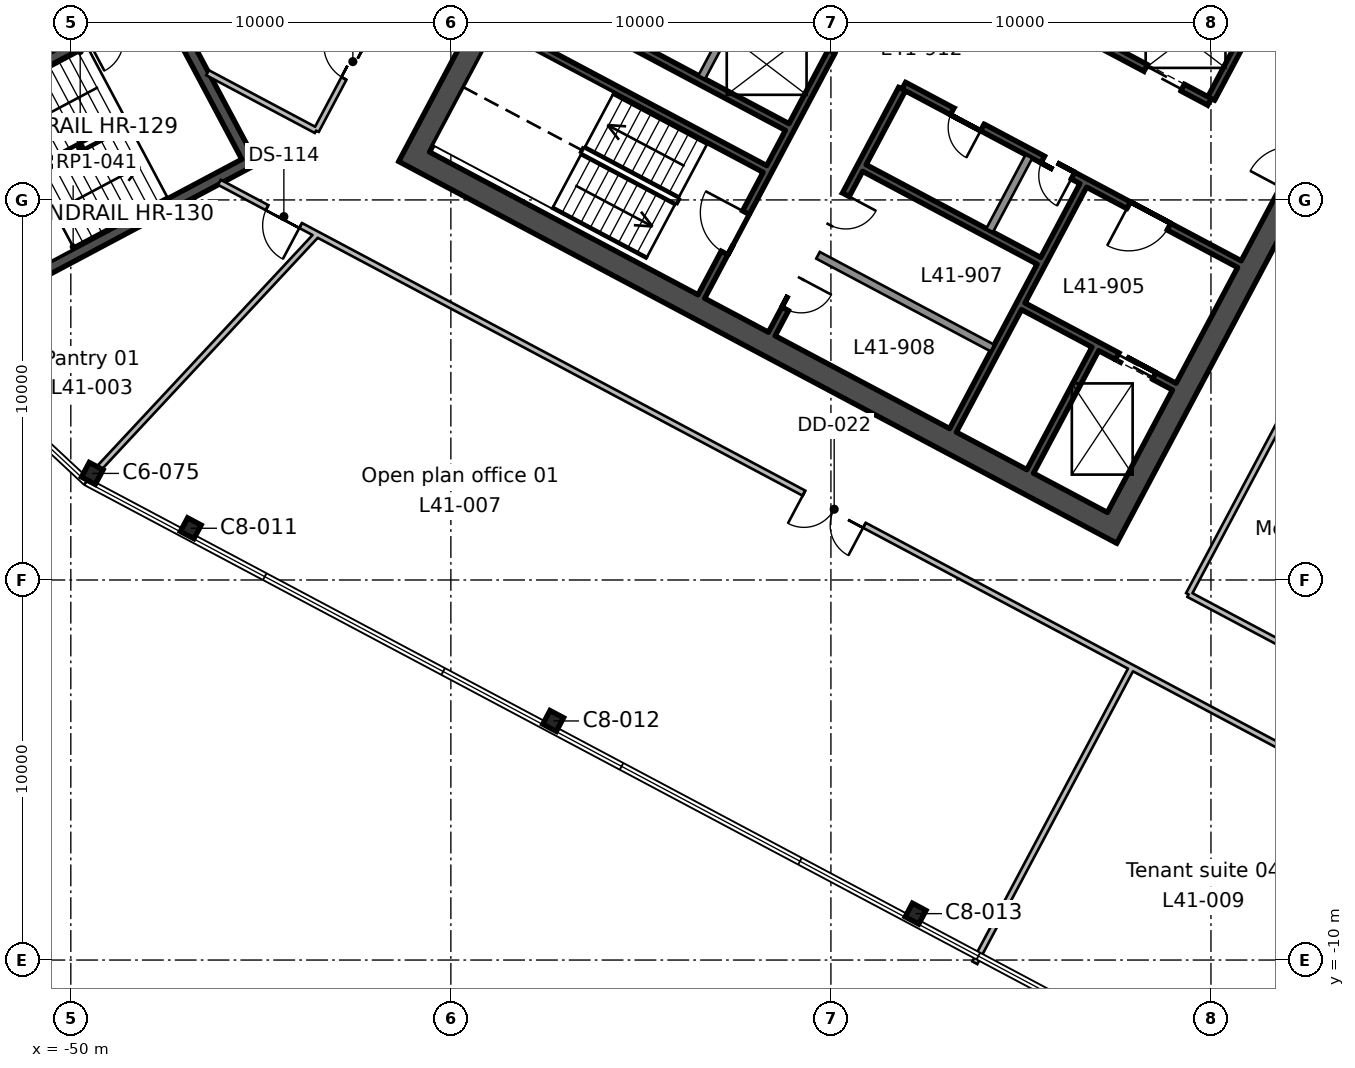
"""IFC4 building model, lengths in metres.
Left out: names, types, materials, properties, quantities, classifications, styles, units other than length and angle.
Written with IfcOpenShell. Run it as: python <this file> out.ifc"""

import sys

from ifc_helpers import new_model, si_unit, direction, frame, frame_2d, origin, origin_2d, place, context, subcontext, project, spatial, rectangle, i_section, extrude, element, fill, save


model = new_model("IFC4")
c1 = context("Model", 3, precision=1e-05, world=origin(), true_north=direction((0.0, 1.0)))
c2 = subcontext(c1, "Body", "Model", "MODEL_VIEW")
j1 = project(units=[si_unit("LENGTHUNIT", "METRE"), si_unit("PLANEANGLEUNIT", "RADIAN")], contexts=[c1])
p1 = place(None, origin())
s1 = spatial("IfcSite", under=j1, at=p1, CompositionType="ELEMENT")
p2 = place(p1, origin())
s2 = spatial("IfcBuilding", under=s1, at=p2, CompositionType="ELEMENT")
p3 = place(p2, frame((0.0, 0.0, 193.5)))
s3 = spatial("IfcBuildingStorey", under=s2, at=p3, CompositionType="ELEMENT", Elevation=193.5)
for number, where, z_axis, x_axis in (
    (1, (-27.772, -8.779, 0.0), (0.0, 0.0, 1.0), (0.883, -0.469, 0.0)),
    (2, (-37.308, -3.709, 0.0), (0.0, 0.0, 1.0), (0.883, -0.469, 0.0)),
    (3, (-46.844, 1.361, 0.0), (0.0, 0.0, 1.0), (0.883, -0.469, 0.0)),
):
    element("IfcColumn", number, at=place(p3, frame(where, z_axis=z_axis, x_axis=x_axis)), inside=s3, PredefinedType="COLUMN", context=c2, shape_type="SweptSolid", body=[
        extrude(i_section(OverallWidth=0.404, OverallDepth=0.406, WebThickness=0.027, FlangeThickness=0.044, FilletRadius=0.015, at=origin_2d()), origin(), (0.0, 0.0, 1.0), 3.9),
    ])
p4 = place(p3, frame((-49.435, 2.804, 0.0), z_axis=(0.0, 0.0, 1.0), x_axis=(0.882947592859, -0.469471562786, 0.0)))
e4 = element("IfcColumn", 4, at=p4, inside=s3, PredefinedType="COLUMN", context=c2, shape_type="SweptSolid", body=[
    extrude(i_section(OverallWidth=0.412, OverallDepth=0.434, WebThickness=0.036, FlangeThickness=0.057, FilletRadius=0.015, at=origin_2d()), origin(), (0.0, 0.0, 1.0), 3.9),
])
p5 = place(p3, frame((-13.635, 18.236, 0.0), z_axis=(0.0, 0.0, 1.0), x_axis=(-0.469478769487, -0.88294376095, 0.0)))
e5 = element("IfcWall", 5, at=p5, inside=s3, PredefinedType="SHEAR", context=c2, shape_type="SweptSolid", body=[
    extrude(rectangle(XDim=19.4, YDim=0.6, at=frame_2d((9.7, 0.0))), origin(), (0.0, 0.0, 1.0), 3.9),
])
p6 = place(p5, frame((6.7, 0.0, 0.0)))
e6 = element("IfcOpeningElement", 6, at=p6, cuts=e5, PredefinedType="OPENING", context=c2, shape_type="SweptSolid", body=[
    extrude(rectangle(XDim=2.4, YDim=2.4, at=frame_2d((1.2, 1.2))), frame((0.0, 0.31, 0.0), z_axis=(0.0, -1.0, 0.0), x_axis=(1.0, 0.0, 0.0)), (0.0, 0.0, 1.0), 0.62),
])
p7 = place(p3, frame((-32.0, 28.001, 0.0), z_axis=(0.0, 0.0, 1.0), x_axis=(-0.469468958625, -0.882948977511, 0.0)))
e7 = element("IfcWall", 7, at=p7, inside=s3, PredefinedType="SHEAR", context=c2, shape_type="SweptSolid", body=[
    extrude(rectangle(XDim=19.4, YDim=0.6, at=frame_2d((9.7, 0.0))), origin(), (0.0, 0.0, 1.0), 3.9),
])
p8 = place(p7, frame((10.3, 0.0, 0.0)))
e8 = element("IfcOpeningElement", 8, at=p8, cuts=e7, PredefinedType="OPENING", context=c2, shape_type="SweptSolid", body=[
    extrude(rectangle(XDim=2.4, YDim=2.4, at=frame_2d((1.2, 1.2))), frame((0.0, 0.31, 0.0), z_axis=(0.0, -1.0, 0.0), x_axis=(1.0, 0.0, 0.0)), (0.0, 0.0, 1.0), 0.62),
])
p9 = place(p3, frame((-22.867, 1.512, 0.0), z_axis=(0.0, 0.0, 1.0), x_axis=(-0.88294509198, 0.469476266226, 0.0)))
e9 = element("IfcWall", 9, at=p9, inside=s3, PredefinedType="SHEAR", context=c2, shape_type="SweptSolid", body=[
    extrude(rectangle(XDim=20.2, YDim=0.6, at=frame_2d((10.1, 0.0))), origin(), (0.0, 0.0, 1.0), 3.9),
])
p10 = place(p3, frame((-23.043, 6.08, 0.0), z_axis=(0.0, 0.0, 1.0), x_axis=(-0.469494272526, -0.882935517501, 0.0)))
e10 = element("IfcWall", 10, at=p10, inside=s3, PredefinedType="SHEAR", context=c2, shape_type="SweptSolid", body=[
    extrude(rectangle(XDim=3.65, YDim=0.2, at=frame_2d((1.825, 0.0))), origin(), (0.0, 0.0, 1.0), 3.9),
])
p11 = place(p3, frame((-18.96, 14.611, 0.0), z_axis=(0.0, 0.0, 1.0), x_axis=(-0.4694473164, -0.882960484464, 0.0)))
e11 = element("IfcWall", 11, at=p11, inside=s3, PredefinedType="SHEAR", context=c2, shape_type="SweptSolid", body=[
    extrude(rectangle(XDim=2.2, YDim=0.2, at=frame_2d((1.1, 0.0))), origin(), (0.0, 0.0, 1.0), 3.9),
])
p12 = place(p3, frame((-23.36, 10.382, 0.0), z_axis=(0.0, 0.0, 1.0), x_axis=(-0.469480409012, -0.88294288918, 0.0)))
e12 = element("IfcWall", 12, at=p12, inside=s3, PredefinedType="SHEAR", context=c2, shape_type="SweptSolid", body=[
    extrude(rectangle(XDim=7.3, YDim=0.2, at=frame_2d((3.65, 0.0))), origin(), (0.0, 0.0, 1.0), 3.9),
])
p13 = place(p3, frame((-24.791, 11.143, 0.0), z_axis=(0.0, 0.0, 1.0), x_axis=(-0.469487830541, -0.882938942948, 0.0)))
e13 = element("IfcWall", 13, at=p13, inside=s3, PredefinedType="SOLIDWALL", context=c2, shape_type="SweptSolid", body=[
    extrude(rectangle(XDim=2.2, YDim=0.2, at=frame_2d((1.1, 0.0))), origin(), (0.0, 0.0, 1.0), 3.9),
])
p14 = place(p3, frame((-28.128, 12.917, 0.0), z_axis=(0.0, 0.0, 1.0), x_axis=(-0.469454336211, -0.882956752176, 0.0)))
e14 = element("IfcWall", 14, at=p14, inside=s3, PredefinedType="SHEAR", context=c2, shape_type="SweptSolid", body=[
    extrude(rectangle(XDim=7.3, YDim=0.2, at=frame_2d((3.65, 0.0))), origin(), (0.0, 0.0, 1.0), 3.9),
])
p15 = place(p14, frame((3.15, 0.0, 0.0)))
e15 = element("IfcOpeningElement", 15, at=p15, cuts=e14, PredefinedType="OPENING", context=c2, shape_type="SweptSolid", body=[
    extrude(rectangle(XDim=0.9, YDim=2.1, at=frame_2d((0.45, 1.05))), frame((0.0, 0.11, 0.0), z_axis=(0.0, -1.0, 0.0), x_axis=(1.0, 0.0, 0.0)), (0.0, 0.0, 1.0), 0.22),
])
p16 = place(p14, frame((5.65, 0.0, 0.0)))
e16 = element("IfcOpeningElement", 16, at=p16, cuts=e14, PredefinedType="OPENING", context=c2, shape_type="SweptSolid", body=[
    extrude(rectangle(XDim=0.9, YDim=2.1, at=frame_2d((0.45, 1.05))), frame((0.0, 0.11, 0.0), z_axis=(0.0, -1.0, 0.0), x_axis=(1.0, 0.0, 0.0)), (0.0, 0.0, 1.0), 0.22),
])
p17 = place(p3, frame((-29.982, 13.903, 0.0), z_axis=(0.0, 0.0, 1.0), x_axis=(-0.469454336211, -0.882956752176, 0.0)))
e17 = element("IfcWall", 17, at=p17, inside=s3, PredefinedType="SHEAR", context=c2, shape_type="SweptSolid", body=[
    extrude(rectangle(XDim=7.3, YDim=0.2, at=frame_2d((3.65, 0.0))), origin(), (0.0, 0.0, 1.0), 3.9),
])
p18 = place(p17, frame((4.8, 0.0, 0.0)))
e18 = element("IfcOpeningElement", 18, at=p18, cuts=e17, PredefinedType="OPENING", context=c2, shape_type="SweptSolid", body=[
    extrude(rectangle(XDim=1.2, YDim=2.1, at=frame_2d((0.6, 1.05))), frame((0.0, 0.11, 0.0), z_axis=(0.0, -1.0, 0.0), x_axis=(1.0, 0.0, 0.0)), (0.0, 0.0, 1.0), 0.22),
])
p19 = place(p3, frame((-32.366, 15.171, 0.0), z_axis=(0.0, 0.0, 1.0), x_axis=(-0.469487830541, -0.882938942948, 0.0)))
e19 = element("IfcWall", 19, at=p19, inside=s3, PredefinedType="SOLIDWALL", context=c2, shape_type="SweptSolid", body=[
    extrude(rectangle(XDim=2.2, YDim=0.2, at=frame_2d((1.1, 0.0))), origin(), (0.0, 0.0, 1.0), 3.9),
])
p20 = place(p3, frame((-16.529, 13.432, 0.0), z_axis=(0.0, 0.0, 1.0), x_axis=(-0.88295287151, 0.469461634952, 0.0)))
e20 = element("IfcWall", 20, at=p20, inside=s3, PredefinedType="SHEAR", context=c2, shape_type="SweptSolid", body=[
    extrude(rectangle(XDim=8.0, YDim=0.2, at=frame_2d((4.0, 0.0))), origin(), (0.0, 0.0, 1.0), 3.9),
])
p21 = place(p3, frame((-20.04, 12.581, 0.0), z_axis=(0.0, 0.0, 1.0), x_axis=(-0.882942972946, 0.469480251476, 0.0)))
e21 = element("IfcWall", 21, at=p21, inside=s3, PredefinedType="SHEAR", context=c2, shape_type="SweptSolid", body=[
    extrude(rectangle(XDim=5.4, YDim=0.2, at=frame_2d((2.7, 0.0))), origin(), (0.0, 0.0, 1.0), 3.9),
])
p22 = place(p21, frame((0.8, 0.0, 0.0)))
e22 = element("IfcOpeningElement", 22, at=p22, cuts=e21, PredefinedType="OPENING", context=c2, shape_type="SweptSolid", body=[
    extrude(rectangle(XDim=1.1, YDim=2.1, at=frame_2d((0.55, 1.05))), frame((0.0, 0.11, 0.0), z_axis=(0.0, -1.0, 0.0), x_axis=(1.0, 0.0, 0.0)), (0.0, 0.0, 1.0), 0.22),
])
p23 = place(p21, frame((3.5, 0.0, 0.0)))
e23 = element("IfcOpeningElement", 23, at=p23, cuts=e21, PredefinedType="OPENING", context=c2, shape_type="SweptSolid", body=[
    extrude(rectangle(XDim=1.1, YDim=2.1, at=frame_2d((0.55, 1.05))), frame((0.0, 0.11, 0.0), z_axis=(0.0, -1.0, 0.0), x_axis=(1.0, 0.0, 0.0)), (0.0, 0.0, 1.0), 0.22),
])
p24 = place(p3, frame((-19.252, 8.311, 0.0), z_axis=(0.0, 0.0, 1.0), x_axis=(-0.882955722218, 0.469456273365, 0.0)))
e24 = element("IfcWall", 24, at=p24, inside=s3, PredefinedType="SHEAR", context=c2, shape_type="SweptSolid", body=[
    extrude(rectangle(XDim=10.0, YDim=0.2, at=frame_2d((5.0, 0.0))), origin(), (0.0, 0.0, 1.0), 3.9),
])
p25 = place(p24, frame((2.1, 0.0, 0.0)))
e25 = element("IfcOpeningElement", 25, at=p25, cuts=e24, PredefinedType="OPENING", context=c2, shape_type="SweptSolid", body=[
    extrude(rectangle(XDim=1.2, YDim=2.1, at=frame_2d((0.6, 1.05))), frame((0.0, 0.11, 0.0), z_axis=(0.0, -1.0, 0.0), x_axis=(1.0, 0.0, 0.0)), (0.0, 0.0, 1.0), 0.22),
])
p26 = place(p24, frame((4.96, 0.0, 0.0)))
e26 = element("IfcOpeningElement", 26, at=p26, cuts=e24, PredefinedType="OPENING", context=c2, shape_type="SweptSolid", body=[
    extrude(rectangle(XDim=0.9, YDim=2.1, at=frame_2d((0.45, 1.05))), frame((0.0, 0.11, 0.0), z_axis=(0.0, -1.0, 0.0), x_axis=(1.0, 0.0, 0.0)), (0.0, 0.0, 1.0), 0.22),
])
p27 = place(p24, frame((7.66, 0.0, 0.0)))
e27 = element("IfcOpeningElement", 27, at=p27, cuts=e24, PredefinedType="OPENING", context=c2, shape_type="SweptSolid", body=[
    extrude(rectangle(XDim=0.9, YDim=2.1, at=frame_2d((0.45, 1.05))), frame((0.0, 0.11, 0.0), z_axis=(0.0, -1.0, 0.0), x_axis=(1.0, 0.0, 0.0)), (0.0, 0.0, 1.0), 0.22),
])
p28 = place(p3, frame((-24.528, 8.398, 0.0), z_axis=(0.0, 0.0, 1.0), x_axis=(-0.882953967957, 0.469459572775, 0.0)))
e28 = element("IfcWall", 28, at=p28, inside=s3, PredefinedType="SHEAR", context=c2, shape_type="SweptSolid", body=[
    extrude(rectangle(XDim=5.2, YDim=0.2, at=frame_2d((2.6, 0.0))), origin(), (0.0, 0.0, 1.0), 3.9),
])
p29 = place(p3, frame((-31.15, 11.919, 0.0), z_axis=(0.0, 0.0, 1.0), x_axis=(-0.882940221191, 0.469485426614, 0.0)))
e29 = element("IfcWall", 29, at=p29, inside=s3, PredefinedType="SHEAR", context=c2, shape_type="SweptSolid", body=[
    extrude(rectangle(XDim=8.0, YDim=0.2, at=frame_2d((4.0, 0.0))), origin(), (0.0, 0.0, 1.0), 3.9),
])
p30 = place(p3, frame((-20.965, 5.088, 0.0), z_axis=(0.0, 0.0, 1.0), x_axis=(-0.882925986334, 0.469512196493, 0.0)))
e30 = element("IfcWall", 30, at=p30, inside=s3, PredefinedType="SHEAR", context=c2, shape_type="SweptSolid", body=[
    extrude(rectangle(XDim=4.5, YDim=0.2, at=frame_2d((2.25, 0.0))), origin(), (0.0, 0.0, 1.0), 3.9),
])
p31 = place(p30, frame((0.6, 0.0, 0.0)))
e31 = element("IfcOpeningElement", 31, at=p31, cuts=e30, PredefinedType="OPENING", context=c2, shape_type="SweptSolid", body=[
    extrude(rectangle(XDim=1.1, YDim=2.1, at=frame_2d((0.55, 1.05))), frame((0.0, 0.11, 0.0), z_axis=(0.0, -1.0, 0.0), x_axis=(1.0, 0.0, 0.0)), (0.0, 0.0, 1.0), 0.22),
])
p32 = place(p3, frame((-31.737, 10.816, 0.0), z_axis=(0.0, 0.0, 1.0), x_axis=(-0.882940221191, 0.469485426614, 0.0)))
e32 = element("IfcWall", 32, at=p32, inside=s3, PredefinedType="SHEAR", context=c2, shape_type="SweptSolid", body=[
    extrude(rectangle(XDim=8.0, YDim=0.2, at=frame_2d((4.0, 0.0))), origin(), (0.0, 0.0, 1.0), 3.9),
])
p33 = place(p3, frame((-25.749, 6.103, 0.0), z_axis=(0.0, 0.0, 1.0), x_axis=(-0.882953967957, 0.469459572775, 0.0)))
e33 = element("IfcWall", 33, at=p33, inside=s3, PredefinedType="SOLIDWALL", context=c2, shape_type="SweptSolid", body=[
    extrude(rectangle(XDim=5.2, YDim=0.2, at=frame_2d((2.6, 0.0))), origin(), (0.0, 0.0, 1.0), 3.9),
])
p34 = place(p3, frame((-47.574, 15.29, 0.0), z_axis=(0.0, 0.0, 1.0), x_axis=(0.469443498566, -0.882962514297, 0.0)))
e34 = element("IfcWall", 34, at=p34, inside=s3, PredefinedType="SHEAR", context=c2, shape_type="SweptSolid", body=[
    extrude(rectangle(XDim=4.85, YDim=0.3, at=frame_2d((2.425, 0.0))), origin(), (0.0, 0.0, 1.0), 3.9),
])
p35 = place(p3, frame((-45.297, 11.007, 0.0), z_axis=(0.0, 0.0, 1.0), x_axis=(-0.882951519127, -0.469464178475, 0.0)))
e35 = element("IfcWall", 35, at=p35, inside=s3, PredefinedType="SHEAR", context=c2, shape_type="SweptSolid", body=[
    extrude(rectangle(XDim=8.3, YDim=0.3, at=frame_2d((4.15, 0.0))), origin(), (0.0, 0.0, 1.0), 3.9),
])
p36 = place(p3, frame((-54.903, 11.393, 0.0), z_axis=(0.0, 0.0, 1.0), x_axis=(0.882939326045, 0.469487110071, 0.0)))
e36 = element("IfcWall", 36, at=p36, inside=s3, PredefinedType="SHEAR", context=c2, shape_type="SweptSolid", body=[
    extrude(rectangle(XDim=8.3, YDim=0.3, at=frame_2d((4.15, 0.0))), origin(), (0.0, 0.0, 1.0), 3.9),
])
p37 = place(p36, frame((6.05, 0.0, 0.0)))
e37 = element("IfcOpeningElement", 37, at=p37, cuts=e36, PredefinedType="OPENING", context=c2, shape_type="SweptSolid", body=[
    extrude(rectangle(XDim=1.9, YDim=2.1, at=frame_2d((0.95, 1.05))), frame((0.0, 0.16, 0.0), z_axis=(0.0, -1.0, 0.0), x_axis=(1.0, 0.0, 0.0)), (0.0, 0.0, 1.0), 0.32),
])
p38 = place(p3, frame((-43.519, 9.096, 0.0), z_axis=(0.0, 0.0, 1.0), x_axis=(-0.681976527411, -0.731374060287, 0.0)))
e38 = element("IfcWall", 38, at=p38, inside=s3, PredefinedType="PARTITIONING", context=c2, shape_type="SweptSolid", body=[
    extrude(rectangle(XDim=8.402, YDim=0.15, at=frame_2d((4.201, 0.0))), origin(), (0.0, 0.0, 1.0), 3.54),
])
p39 = place(p3, frame((-22.083, -2.302, 0.0), z_axis=(0.0, 0.0, 1.0), x_axis=(-0.469445946219, -0.882961212952, 0.0)))
e39 = element("IfcWall", 39, at=p39, inside=s3, PredefinedType="PARTITIONING", context=c2, shape_type="SweptSolid", body=[
    extrude(rectangle(XDim=8.8, YDim=0.15, at=frame_2d((4.4, 0.0))), origin(), (0.0, 0.0, 1.0), 3.54),
])
p40 = place(p3, frame((-46.403, 13.347, 0.0), z_axis=(0.0, 0.0, 1.0), x_axis=(0.882974130461, -0.469421649411, 0.0)))
e40 = element("IfcWall", 40, at=p40, inside=s3, PredefinedType="PARTITIONING", context=c2, shape_type="SweptSolid", body=[
    extrude(rectangle(XDim=3.238, YDim=0.15, at=frame_2d((1.619, 0.0))), origin(), (0.0, 0.0, 1.0), 3.54),
])
p41 = place(p3, frame((-41.618, 15.45, 0.0), z_axis=(0.0, 0.0, 1.0), x_axis=(-0.468819008191, -0.883294253099, 0.0)))
e41 = element("IfcWall", 41, at=p41, inside=s3, PredefinedType="PARTITIONING", context=c2, shape_type="SweptSolid", body=[
    extrude(rectangle(XDim=4.106, YDim=0.15, at=frame_2d((2.053, 0.0))), origin(), (0.0, 0.0, 1.0), 3.54),
])
p42 = place(p41, frame((1.55, 0.0, 0.0)))
e42 = element("IfcOpeningElement", 42, at=p42, cuts=e41, PredefinedType="OPENING", context=c2, shape_type="SweptSolid", body=[
    extrude(rectangle(XDim=1.0, YDim=2.1, at=frame_2d((0.5, 1.05))), frame((0.0, 0.085, 0.0), z_axis=(0.0, -1.0, 0.0), x_axis=(1.0, 0.0, 0.0)), (0.0, 0.0, 1.0), 0.17),
])
p43 = place(p3, frame((-13.8, -6.706, 0.0), z_axis=(0.0, 0.0, 1.0), x_axis=(-0.882947286887, 0.469472138235, 0.0)))
e43 = element("IfcWall", 43, at=p43, inside=s3, PredefinedType="PARTITIONING", context=c2, shape_type="SweptSolid", body=[
    extrude(rectangle(XDim=36.571, YDim=0.15, at=frame_2d((18.285, 0.0))), origin(), (0.0, 0.0, 1.0), 3.54),
])
p44 = place(p43, frame((34.15, 0.0, 0.0)))
e44 = element("IfcOpeningElement", 44, at=p44, cuts=e43, PredefinedType="OPENING", context=c2, shape_type="SweptSolid", body=[
    extrude(rectangle(XDim=1.0, YDim=2.1, at=frame_2d((0.5, 1.05))), frame((0.0, 0.085, 0.0), z_axis=(0.0, -1.0, 0.0), x_axis=(1.0, 0.0, 0.0)), (0.0, 0.0, 1.0), 0.17),
])
p45 = place(p43, frame((17.35, 0.0, 0.0)))
e45 = element("IfcOpeningElement", 45, at=p45, cuts=e43, PredefinedType="OPENING", context=c2, shape_type="SweptSolid", body=[
    extrude(rectangle(XDim=1.8, YDim=2.1, at=frame_2d((0.9, 1.05))), frame((0.0, 0.085, 0.0), z_axis=(0.0, -1.0, 0.0), x_axis=(1.0, 0.0, 0.0)), (0.0, 0.0, 1.0), 0.17),
])
p46 = place(p3, frame((-20.588, -0.379, 0.0), z_axis=(0.0, 0.0, 1.0), x_axis=(0.469489882812, 0.882937851685, 0.0)))
e46 = element("IfcWall", 46, at=p46, inside=s3, PredefinedType="PARTITIONING", context=c2, shape_type="SweptSolid", body=[
    extrude(rectangle(XDim=20.0, YDim=0.15, at=frame_2d((10.0, 0.0))), origin(), (0.0, 0.0, 1.0), 3.54),
])
p47 = place(p46, frame((9.55, 0.0, 0.0)))
e47 = element("IfcOpeningElement", 47, at=p47, cuts=e46, PredefinedType="OPENING", context=c2, shape_type="SweptSolid", body=[
    extrude(rectangle(XDim=1.0, YDim=2.1, at=frame_2d((0.5, 1.05))), frame((0.0, 0.085, 0.0), z_axis=(0.0, -1.0, 0.0), x_axis=(1.0, 0.0, 0.0)), (0.0, 0.0, 1.0), 0.17),
])
p48 = place(p3, frame((-13.8, -3.988, 0.0), z_axis=(0.0, 0.0, 1.0), x_axis=(-0.882949137368, 0.469468657976, 0.0)))
e48 = element("IfcWall", 48, at=p48, inside=s3, PredefinedType="PARTITIONING", context=c2, shape_type="SweptSolid", body=[
    extrude(rectangle(XDim=7.688, YDim=0.15, at=frame_2d((3.844, 0.0))), origin(), (0.0, 0.0, 1.0), 3.54),
])
p49 = place(p25, origin())
e49 = element("IfcDoor", 49, at=p49, inside=s3, OperationType="SINGLE_SWING_RIGHT", PredefinedType="DOOR", context=c2, shape_type="SweptSolid", body=[
    extrude(rectangle(XDim=1.2, YDim=2.1, at=frame_2d((0.6, 1.05))), frame((0.0, 0.025, 0.0), z_axis=(0.0, -1.0, 0.0), x_axis=(1.0, 0.0, 0.0)), (0.0, 0.0, 1.0), 0.05),
])
fill(e25, e49)
p50 = place(p18, frame((1.2, 0.0, 0.0), z_axis=(0.0, 0.0, 1.0), x_axis=(-1.0, 0.0, 0.0)))
e50 = element("IfcDoor", 50, at=p50, inside=s3, OperationType="SINGLE_SWING_RIGHT", PredefinedType="DOOR", context=c2, shape_type="SweptSolid", body=[
    extrude(rectangle(XDim=1.2, YDim=2.1, at=frame_2d((0.6, 1.05))), frame((0.0, 0.025, 0.0), z_axis=(0.0, -1.0, 0.0), x_axis=(1.0, 0.0, 0.0)), (0.0, 0.0, 1.0), 0.05),
])
fill(e18, e50)
p51 = place(p26, origin())
e51 = element("IfcDoor", 51, at=p51, inside=s3, OperationType="SINGLE_SWING_LEFT", PredefinedType="DOOR", context=c2, shape_type="SweptSolid", body=[
    extrude(rectangle(XDim=0.9, YDim=2.1, at=frame_2d((0.45, 1.05))), frame((0.0, 0.025, 0.0), z_axis=(0.0, -1.0, 0.0), x_axis=(1.0, 0.0, 0.0)), (0.0, 0.0, 1.0), 0.05),
])
fill(e26, e51)
p52 = place(p27, origin())
e52 = element("IfcDoor", 52, at=p52, inside=s3, OperationType="SINGLE_SWING_LEFT", PredefinedType="DOOR", context=c2, shape_type="SweptSolid", body=[
    extrude(rectangle(XDim=0.9, YDim=2.1, at=frame_2d((0.45, 1.05))), frame((0.0, 0.025, 0.0), z_axis=(0.0, -1.0, 0.0), x_axis=(1.0, 0.0, 0.0)), (0.0, 0.0, 1.0), 0.05),
])
fill(e27, e52)
p53 = place(p22, origin())
e53 = element("IfcDoor", 53, at=p53, inside=s3, OperationType="DOUBLE_DOOR_SLIDING", PredefinedType="DOOR", context=c2, shape_type="SweptSolid", body=[
    extrude(rectangle(XDim=1.1, YDim=2.1, at=frame_2d((0.55, 1.05))), frame((0.0, 0.025, 0.0), z_axis=(0.0, -1.0, 0.0), x_axis=(1.0, 0.0, 0.0)), (0.0, 0.0, 1.0), 0.05),
])
fill(e22, e53)
p54 = place(p31, origin())
e54 = element("IfcDoor", 54, at=p54, inside=s3, OperationType="DOUBLE_DOOR_SLIDING", PredefinedType="DOOR", context=c2, shape_type="SweptSolid", body=[
    extrude(rectangle(XDim=1.1, YDim=2.1, at=frame_2d((0.55, 1.05))), frame((0.0, 0.025, 0.0), z_axis=(0.0, -1.0, 0.0), x_axis=(1.0, 0.0, 0.0)), (0.0, 0.0, 1.0), 0.05),
])
fill(e31, e54)
p55 = place(p15, origin())
e55 = element("IfcDoor", 55, at=p55, inside=s3, OperationType="SINGLE_SWING_LEFT", PredefinedType="DOOR", context=c2, shape_type="SweptSolid", body=[
    extrude(rectangle(XDim=0.9, YDim=2.1, at=frame_2d((0.45, 1.05))), frame((0.0, 0.025, 0.0), z_axis=(0.0, -1.0, 0.0), x_axis=(1.0, 0.0, 0.0)), (0.0, 0.0, 1.0), 0.05),
])
fill(e15, e55)
p56 = place(p16, origin())
e56 = element("IfcDoor", 56, at=p56, inside=s3, OperationType="SINGLE_SWING_LEFT", PredefinedType="DOOR", context=c2, shape_type="SweptSolid", body=[
    extrude(rectangle(XDim=0.9, YDim=2.1, at=frame_2d((0.45, 1.05))), frame((0.0, 0.025, 0.0), z_axis=(0.0, -1.0, 0.0), x_axis=(1.0, 0.0, 0.0)), (0.0, 0.0, 1.0), 0.05),
])
fill(e16, e56)
p57 = place(p42, frame((1.0, 0.0, 0.0), z_axis=(0.0, 0.0, 1.0), x_axis=(-1.0, 0.0, 0.0)))
e57 = element("IfcDoor", 57, at=p57, inside=s3, OperationType="SINGLE_SWING_RIGHT", PredefinedType="DOOR", context=c2, shape_type="SweptSolid", body=[
    extrude(rectangle(XDim=1.0, YDim=2.1, at=frame_2d((0.5, 1.05))), frame((0.0, 0.025, 0.0), z_axis=(0.0, -1.0, 0.0), x_axis=(1.0, 0.0, 0.0)), (0.0, 0.0, 1.0), 0.05),
])
fill(e42, e57)
p58 = place(p44, origin())
e58 = element("IfcDoor", 58, at=p58, inside=s3, OperationType="SINGLE_SWING_LEFT", PredefinedType="DOOR", context=c2, shape_type="SweptSolid", body=[
    extrude(rectangle(XDim=1.0, YDim=2.1, at=frame_2d((0.5, 1.05))), frame((0.0, 0.025, 0.0), z_axis=(0.0, -1.0, 0.0), x_axis=(1.0, 0.0, 0.0)), (0.0, 0.0, 1.0), 0.05),
])
fill(e44, e58)
p59 = place(p45, origin())
e59 = element("IfcDoor", 59, at=p59, inside=s3, OperationType="DOUBLE_DOOR_SINGLE_SWING", PredefinedType="DOOR", context=c2, shape_type="SweptSolid", body=[
    extrude(rectangle(XDim=1.8, YDim=2.1, at=frame_2d((0.9, 1.05))), frame((0.0, 0.025, 0.0), z_axis=(0.0, -1.0, 0.0), x_axis=(1.0, 0.0, 0.0)), (0.0, 0.0, 1.0), 0.05),
])
fill(e45, e59)
save(model, sys.argv[1])
